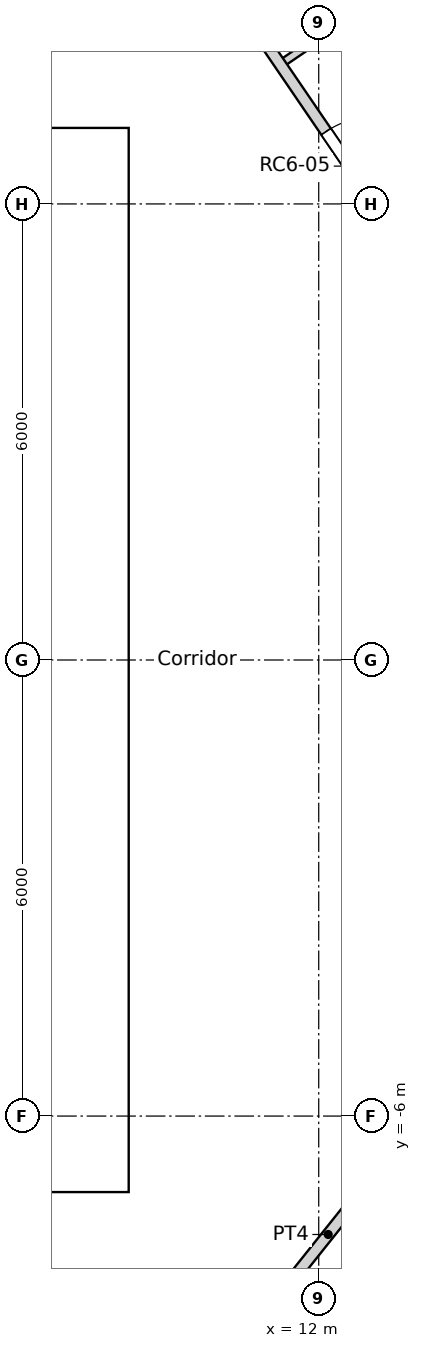
"""IFC4 building model, lengths in metres.
Left out: names, types, materials, properties, quantities, classifications, styles, units other than length and angle.
Written with IfcOpenShell. Run it as: python <this file> out.ifc"""

import sys

from ifc_helpers import new_model, si_unit, direction, frame, frame_2d, origin, place, context, subcontext, project, spatial, rectangle, extrude, element, fill, save


model = new_model("IFC4")
c1 = context("Model", 3, precision=1e-05, world=origin(), true_north=direction((0.0, 1.0)))
c2 = subcontext(c1, "Body", "Model", "MODEL_VIEW")
j1 = project(units=[si_unit("LENGTHUNIT", "METRE"), si_unit("PLANEANGLEUNIT", "RADIAN")], contexts=[c1])
p1 = place(None, origin())
s1 = spatial("IfcSite", under=j1, at=p1, CompositionType="ELEMENT")
p2 = place(p1, origin())
s2 = spatial("IfcBuilding", under=s1, at=p2, CompositionType="ELEMENT")
p3 = place(p2, frame((0.0, 0.0, 283.8)))
s3 = spatial("IfcBuildingStorey", under=s2, at=p3, CompositionType="ELEMENT", Elevation=283.8)
p4 = place(p3, frame((-9.5, -6.7, 0.0), z_axis=(0.0, 0.0, 1.0), x_axis=(1.0, 0.0, 0.0)))
e1 = element("IfcWall", 1, at=p4, inside=s3, PredefinedType="SOLIDWALL", context=c2, shape_type="SweptSolid", body=[
    extrude(rectangle(XDim=19.0, YDim=0.6, at=frame_2d((9.5, 0.0))), origin(), (0.0, 0.0, 1.0), 3.6),
])
p5 = place(p4, frame((10.4, 0.0, 0.0)))
e2 = element("IfcOpeningElement", 2, at=p5, cuts=e1, PredefinedType="OPENING", context=c2, shape_type="SweptSolid", body=[
    extrude(rectangle(XDim=1.0, YDim=2.1, at=frame_2d((0.5, 1.05))), frame((0.0, 0.3, 0.0), z_axis=(0.0, -1.0, 0.0), x_axis=(1.0, 0.0, 0.0)), (0.0, 0.0, 1.0), 0.6),
])
p6 = place(p4, frame((5.35, 0.0, 0.0)))
e3 = element("IfcOpeningElement", 3, at=p6, cuts=e1, PredefinedType="OPENING", context=c2, shape_type="SweptSolid", body=[
    extrude(rectangle(XDim=1.7, YDim=2.1, at=frame_2d((0.85, 1.05))), frame((0.0, 0.3, 0.0), z_axis=(0.0, -1.0, 0.0), x_axis=(1.0, 0.0, 0.0)), (0.0, 0.0, 1.0), 0.6),
])
p7 = place(p4, frame((11.95, 0.0, 0.0)))
e4 = element("IfcOpeningElement", 4, at=p7, cuts=e1, PredefinedType="OPENING", context=c2, shape_type="SweptSolid", body=[
    extrude(rectangle(XDim=1.7, YDim=2.1, at=frame_2d((0.85, 1.05))), frame((0.0, 0.3, 0.0), z_axis=(0.0, -1.0, 0.0), x_axis=(1.0, 0.0, 0.0)), (0.0, 0.0, 1.0), 0.6),
])
p8 = place(p3, frame((-9.5, 6.7, 0.0), z_axis=(0.0, 0.0, 1.0), x_axis=(1.0, 0.0, 0.0)))
e5 = element("IfcWall", 5, at=p8, inside=s3, PredefinedType="SOLIDWALL", context=c2, shape_type="SweptSolid", body=[
    extrude(rectangle(XDim=19.0, YDim=0.6, at=frame_2d((9.5, 0.0))), origin(), (0.0, 0.0, 1.0), 3.6),
])
p9 = place(p8, frame((5.35, 0.0, 0.0)))
e6 = element("IfcOpeningElement", 6, at=p9, cuts=e5, PredefinedType="OPENING", context=c2, shape_type="SweptSolid", body=[
    extrude(rectangle(XDim=1.7, YDim=2.1, at=frame_2d((0.85, 1.05))), frame((0.0, 0.3, 0.0), z_axis=(0.0, -1.0, 0.0), x_axis=(1.0, 0.0, 0.0)), (0.0, 0.0, 1.0), 0.6),
])
p10 = place(p3, frame((9.2, -6.4, 0.0), z_axis=(0.0, 0.0, 1.0), x_axis=(0.0, 1.0, 0.0)))
e7 = element("IfcWall", 7, at=p10, inside=s3, PredefinedType="SOLIDWALL", context=c2, shape_type="SweptSolid", body=[
    extrude(rectangle(XDim=12.8, YDim=0.6, at=frame_2d((6.4, 0.0))), origin(), (0.0, 0.0, 1.0), 3.6),
])
p11 = place(p10, frame((6.4, 0.0, 0.0)))
e8 = element("IfcOpeningElement", 8, at=p11, cuts=e7, PredefinedType="OPENING", context=c2, shape_type="SweptSolid", body=[
    extrude(rectangle(XDim=1.8, YDim=2.1, at=frame_2d((0.9, 1.05))), frame((0.0, 0.3, 0.0), z_axis=(0.0, -1.0, 0.0), x_axis=(1.0, 0.0, 0.0)), (0.0, 0.0, 1.0), 0.6),
])
p12 = place(p3, frame((2.1, -3.1, 0.0), z_axis=(0.0, 0.0, 1.0), x_axis=(1.0, 0.0, 0.0)))
e9 = element("IfcWall", 9, at=p12, inside=s3, PredefinedType="SOLIDWALL", context=c2, shape_type="SweptSolid", body=[
    extrude(rectangle(XDim=6.8, YDim=0.3, at=frame_2d((3.4, 0.0))), origin(), (0.0, 0.0, 1.0), 3.25),
])
p13 = place(p12, frame((0.35, 0.0, 0.0)))
e10 = element("IfcOpeningElement", 10, at=p13, cuts=e9, PredefinedType="OPENING", context=c2, shape_type="SweptSolid", body=[
    extrude(rectangle(XDim=1.7, YDim=2.1, at=frame_2d((0.85, 1.05))), frame((0.0, 0.15, 0.0), z_axis=(0.0, -1.0, 0.0), x_axis=(1.0, 0.0, 0.0)), (0.0, 0.0, 1.0), 0.3),
])
p14 = place(p3, frame((-4.35, 3.1, 0.0), z_axis=(0.0, 0.0, 1.0), x_axis=(1.0, 0.0, 0.0)))
e11 = element("IfcWall", 11, at=p14, inside=s3, PredefinedType="SOLIDWALL", context=c2, shape_type="SweptSolid", body=[
    extrude(rectangle(XDim=13.25, YDim=0.3, at=frame_2d((6.625, 0.0))), origin(), (0.0, 0.0, 1.0), 3.25),
])
p15 = place(p14, frame((2.95, 0.0, 0.0)))
e12 = element("IfcOpeningElement", 12, at=p15, cuts=e11, PredefinedType="OPENING", context=c2, shape_type="SweptSolid", body=[
    extrude(rectangle(XDim=1.1, YDim=2.1, at=frame_2d((0.55, 1.05))), frame((0.0, 0.15, 0.0), z_axis=(0.0, -1.0, 0.0), x_axis=(1.0, 0.0, 0.0)), (0.0, 0.0, 1.0), 0.3),
])
p16 = place(p14, frame((5.75, 0.0, 0.0)))
e13 = element("IfcOpeningElement", 13, at=p16, cuts=e11, PredefinedType="OPENING", context=c2, shape_type="SweptSolid", body=[
    extrude(rectangle(XDim=1.1, YDim=2.1, at=frame_2d((0.55, 1.05))), frame((0.0, 0.15, 0.0), z_axis=(0.0, -1.0, 0.0), x_axis=(1.0, 0.0, 0.0)), (0.0, 0.0, 1.0), 0.3),
])
p17 = place(p14, frame((8.55, 0.0, 0.0)))
e14 = element("IfcOpeningElement", 14, at=p17, cuts=e11, PredefinedType="OPENING", context=c2, shape_type="SweptSolid", body=[
    extrude(rectangle(XDim=1.1, YDim=2.1, at=frame_2d((0.55, 1.05))), frame((0.0, 0.15, 0.0), z_axis=(0.0, -1.0, 0.0), x_axis=(1.0, 0.0, 0.0)), (0.0, 0.0, 1.0), 0.3),
])
p18 = place(p3, frame((4.225, -0.425, 0.0), z_axis=(0.0, 0.0, 1.0), x_axis=(1.0, 0.0, 0.0)))
e15 = element("IfcWall", 15, at=p18, inside=s3, PredefinedType="SOLIDWALL", context=c2, shape_type="SweptSolid", body=[
    extrude(rectangle(XDim=4.675, YDim=0.15, at=frame_2d((2.337, 0.0))), origin(), (0.0, 0.0, 1.0), 3.25),
])
p19 = place(p18, frame((0.85, 0.0, 0.0)))
e16 = element("IfcOpeningElement", 16, at=p19, cuts=e15, PredefinedType="OPENING", context=c2, shape_type="SweptSolid", body=[
    extrude(rectangle(XDim=0.9, YDim=2.1, at=frame_2d((0.45, 1.05))), frame((0.0, 0.075, 0.0), z_axis=(0.0, -1.0, 0.0), x_axis=(1.0, 0.0, 0.0)), (0.0, 0.0, 1.0), 0.15),
])
p20 = place(p18, frame((3.188, 0.0, 0.0)))
e17 = element("IfcOpeningElement", 17, at=p20, cuts=e15, PredefinedType="OPENING", context=c2, shape_type="SweptSolid", body=[
    extrude(rectangle(XDim=0.9, YDim=2.1, at=frame_2d((0.45, 1.05))), frame((0.0, 0.075, 0.0), z_axis=(0.0, -1.0, 0.0), x_axis=(1.0, 0.0, 0.0)), (0.0, 0.0, 1.0), 0.15),
])
p21 = place(p3, frame((11.3, 8.119, 0.0), z_axis=(0.0, 0.0, 1.0), x_axis=(0.56348561488, -0.82612587529, 0.0)))
e18 = element("IfcWall", 18, at=p21, inside=s3, PredefinedType="PARTITIONING", context=c2, shape_type="SweptSolid", body=[
    extrude(rectangle(XDim=4.633, YDim=0.15, at=frame_2d((2.316, 0.0))), origin(), (0.0, 0.0, 1.0), 3.25),
])
p22 = place(p21, frame((1.413, 0.0, 0.0)))
e19 = element("IfcOpeningElement", 19, at=p22, cuts=e18, PredefinedType="OPENING", context=c2, shape_type="SweptSolid", body=[
    extrude(rectangle(XDim=1.1, YDim=2.1, at=frame_2d((0.55, 1.05))), frame((0.0, 0.075, 0.0), z_axis=(0.0, -1.0, 0.0), x_axis=(1.0, 0.0, 0.0)), (0.0, 0.0, 1.0), 0.15),
])
p23 = place(p3, frame((11.134, -8.8, 0.0), z_axis=(0.0, 0.0, 1.0), x_axis=(0.623476099415, 0.781842409606, 0.0)))
e20 = element("IfcWall", 20, at=p23, inside=s3, PredefinedType="PARTITIONING", context=c2, shape_type="SweptSolid", body=[
    extrude(rectangle(XDim=3.177, YDim=0.15, at=frame_2d((1.589, 0.0))), origin(), (0.0, 0.0, 1.0), 3.25),
])
p24 = place(p3, frame((11.493, 7.836, 0.0), z_axis=(0.0, 0.0, 1.0), x_axis=(0.826231748746, 0.563330362544, 0.0)))
e21 = element("IfcWall", 21, at=p24, inside=s3, PredefinedType="PARTITIONING", context=c2, shape_type="SweptSolid", body=[
    extrude(rectangle(XDim=5.862, YDim=0.1, at=frame_2d((2.931, 0.0))), origin(), (0.0, 0.0, 1.0), 3.25),
])
p25 = place(p24, frame((2.431, 0.0, 0.0)))
e22 = element("IfcOpeningElement", 22, at=p25, cuts=e21, PredefinedType="OPENING", context=c2, shape_type="SweptSolid", body=[
    extrude(rectangle(XDim=1.0, YDim=2.04, at=frame_2d((0.5, 1.02))), frame((0.0, 0.05, 0.0), z_axis=(0.0, -1.0, 0.0), x_axis=(1.0, 0.0, 0.0)), (0.0, 0.0, 1.0), 0.1),
])
p26 = place(p11, origin())
e23 = element("IfcDoor", 23, at=p26, inside=s3, OperationType="DOUBLE_DOOR_SINGLE_SWING", PredefinedType="DOOR", context=c2, shape_type="SweptSolid", body=[
    extrude(rectangle(XDim=1.8, YDim=2.1, at=frame_2d((0.9, 1.05))), frame((0.0, 0.025, 0.0), z_axis=(0.0, -1.0, 0.0), x_axis=(1.0, 0.0, 0.0)), (0.0, 0.0, 1.0), 0.05),
])
fill(e8, e23)
p27 = place(p22, origin())
e24 = element("IfcDoor", 24, at=p27, inside=s3, OperationType="SINGLE_SWING_RIGHT", PredefinedType="DOOR", context=c2, shape_type="SweptSolid", body=[
    extrude(rectangle(XDim=1.1, YDim=2.1, at=frame_2d((0.55, 1.05))), frame((0.0, 0.025, 0.0), z_axis=(0.0, -1.0, 0.0), x_axis=(1.0, 0.0, 0.0)), (0.0, 0.0, 1.0), 0.05),
])
fill(e19, e24)
save(model, sys.argv[1])
